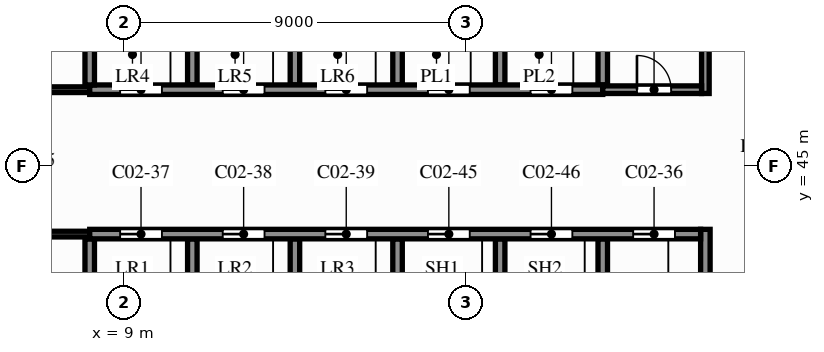
"""IFC4 building model, lengths in metres.
Left out: names, types, materials, properties, quantities, classifications, styles, units other than length and angle.
Written with IfcOpenShell. Run it as: python <this file> out.ifc"""

import sys

from ifc_helpers import new_model, si_unit, direction, frame, frame_2d, origin, place, context, subcontext, project, spatial, rectangle, extrude, element, fill, save


model = new_model("IFC4")
c1 = context("Model", 3, precision=1e-05, world=origin(), true_north=direction((0.0, 1.0)))
c2 = subcontext(c1, "Body", "Model", "MODEL_VIEW")
j1 = project(units=[si_unit("LENGTHUNIT", "METRE"), si_unit("PLANEANGLEUNIT", "RADIAN")], contexts=[c1])
p1 = place(None, origin())
s1 = spatial("IfcSite", under=j1, at=p1, CompositionType="ELEMENT")
p2 = place(p1, origin())
s2 = spatial("IfcBuilding", under=s1, at=p2, CompositionType="ELEMENT")
p3 = place(p2, origin())
s3 = spatial("IfcBuildingStorey", under=s2, at=p3, CompositionType="ELEMENT", Elevation=0.0)
p4 = place(p3, frame((0.15, 43.2, 0.0), z_axis=(0.0, 0.0, 1.0), x_axis=(1.0, 0.0, 0.0)))
e1 = element("IfcWall", 1, at=p4, inside=s3, PredefinedType="PARTITIONING", context=c2, shape_type="SweptSolid", body=[
    extrude(rectangle(XDim=7.95, YDim=0.15, at=frame_2d((3.975, 0.0))), origin(), (0.0, 0.0, 1.0), 7.2),
])
p5 = place(p4, frame((1.25, 0.0, 0.0)))
e2 = element("IfcOpeningElement", 2, at=p5, cuts=e1, PredefinedType="OPENING", context=c2, shape_type="SweptSolid", body=[
    extrude(rectangle(XDim=0.9, YDim=2.1, at=frame_2d((0.45, 1.05))), frame((0.0, 0.085, 0.0), z_axis=(0.0, -1.0, 0.0), x_axis=(1.0, 0.0, 0.0)), (0.0, 0.0, 1.0), 0.17),
])
p6 = place(p4, frame((4.975, 0.0, 0.0)))
e3 = element("IfcOpeningElement", 3, at=p6, cuts=e1, PredefinedType="OPENING", context=c2, shape_type="SweptSolid", body=[
    extrude(rectangle(XDim=0.9, YDim=2.1, at=frame_2d((0.45, 1.05))), frame((0.0, 0.085, 0.0), z_axis=(0.0, -1.0, 0.0), x_axis=(1.0, 0.0, 0.0)), (0.0, 0.0, 1.0), 0.17),
])
p7 = place(p3, frame((8.1, 43.2, 0.0), z_axis=(0.0, 0.0, 1.0), x_axis=(1.0, 0.0, 0.0)))
e4 = element("IfcWall", 4, at=p7, inside=s3, PredefinedType="SHEAR", context=c2, shape_type="SweptSolid", body=[
    extrude(rectangle(XDim=16.075, YDim=0.25, at=frame_2d((8.038, 0.0))), origin(), (0.0, 0.0, 1.0), 7.2),
])
p8 = place(p7, frame((14.3, 0.0, 0.0)))
e5 = element("IfcOpeningElement", 5, at=p8, cuts=e4, PredefinedType="OPENING", context=c2, shape_type="SweptSolid", body=[
    extrude(rectangle(XDim=1.1, YDim=2.1, at=frame_2d((0.55, 1.05))), frame((0.0, 0.135, 0.0), z_axis=(0.0, -1.0, 0.0), x_axis=(1.0, 0.0, 0.0)), (0.0, 0.0, 1.0), 0.27),
])
p9 = place(p7, frame((0.8, 0.0, 0.0)))
e6 = element("IfcOpeningElement", 6, at=p9, cuts=e4, PredefinedType="OPENING", context=c2, shape_type="SweptSolid", body=[
    extrude(rectangle(XDim=1.1, YDim=2.1, at=frame_2d((0.55, 1.05))), frame((0.0, 0.135, 0.0), z_axis=(0.0, -1.0, 0.0), x_axis=(1.0, 0.0, 0.0)), (0.0, 0.0, 1.0), 0.27),
])
p10 = place(p7, frame((3.5, 0.0, 0.0)))
e7 = element("IfcOpeningElement", 7, at=p10, cuts=e4, PredefinedType="OPENING", context=c2, shape_type="SweptSolid", body=[
    extrude(rectangle(XDim=1.1, YDim=2.1, at=frame_2d((0.55, 1.05))), frame((0.0, 0.135, 0.0), z_axis=(0.0, -1.0, 0.0), x_axis=(1.0, 0.0, 0.0)), (0.0, 0.0, 1.0), 0.27),
])
p11 = place(p7, frame((6.2, 0.0, 0.0)))
e8 = element("IfcOpeningElement", 8, at=p11, cuts=e4, PredefinedType="OPENING", context=c2, shape_type="SweptSolid", body=[
    extrude(rectangle(XDim=1.1, YDim=2.1, at=frame_2d((0.55, 1.05))), frame((0.0, 0.135, 0.0), z_axis=(0.0, -1.0, 0.0), x_axis=(1.0, 0.0, 0.0)), (0.0, 0.0, 1.0), 0.27),
])
p12 = place(p7, frame((8.9, 0.0, 0.0)))
e9 = element("IfcOpeningElement", 9, at=p12, cuts=e4, PredefinedType="OPENING", context=c2, shape_type="SweptSolid", body=[
    extrude(rectangle(XDim=1.1, YDim=2.1, at=frame_2d((0.55, 1.05))), frame((0.0, 0.135, 0.0), z_axis=(0.0, -1.0, 0.0), x_axis=(1.0, 0.0, 0.0)), (0.0, 0.0, 1.0), 0.27),
])
p13 = place(p7, frame((11.6, 0.0, 0.0)))
e10 = element("IfcOpeningElement", 10, at=p13, cuts=e4, PredefinedType="OPENING", context=c2, shape_type="SweptSolid", body=[
    extrude(rectangle(XDim=1.1, YDim=2.1, at=frame_2d((0.55, 1.05))), frame((0.0, 0.135, 0.0), z_axis=(0.0, -1.0, 0.0), x_axis=(1.0, 0.0, 0.0)), (0.0, 0.0, 1.0), 0.27),
])
p14 = place(p3, frame((0.15, 47.0, 0.0), z_axis=(0.0, 0.0, 1.0), x_axis=(1.0, 0.0, 0.0)))
e11 = element("IfcWall", 11, at=p14, inside=s3, PredefinedType="PARTITIONING", context=c2, shape_type="SweptSolid", body=[
    extrude(rectangle(XDim=7.95, YDim=0.15, at=frame_2d((3.975, 0.0))), origin(), (0.0, 0.0, 1.0), 7.2),
])
p15 = place(p14, frame((1.25, 0.0, 0.0)))
e12 = element("IfcOpeningElement", 12, at=p15, cuts=e11, PredefinedType="OPENING", context=c2, shape_type="SweptSolid", body=[
    extrude(rectangle(XDim=0.9, YDim=2.1, at=frame_2d((0.45, 1.05))), frame((0.0, 0.085, 0.0), z_axis=(0.0, -1.0, 0.0), x_axis=(1.0, 0.0, 0.0)), (0.0, 0.0, 1.0), 0.17),
])
p16 = place(p14, frame((4.975, 0.0, 0.0)))
e13 = element("IfcOpeningElement", 13, at=p16, cuts=e11, PredefinedType="OPENING", context=c2, shape_type="SweptSolid", body=[
    extrude(rectangle(XDim=0.9, YDim=2.1, at=frame_2d((0.45, 1.05))), frame((0.0, 0.085, 0.0), z_axis=(0.0, -1.0, 0.0), x_axis=(1.0, 0.0, 0.0)), (0.0, 0.0, 1.0), 0.17),
])
p17 = place(p3, frame((21.6, 47.0, 0.0), z_axis=(0.0, 0.0, 1.0), x_axis=(1.0, 0.0, 0.0)))
e14 = element("IfcWall", 14, at=p17, inside=s3, PredefinedType="PARTITIONING", context=c2, shape_type="SweptSolid", body=[
    extrude(rectangle(XDim=2.6, YDim=0.2, at=frame_2d((1.3, 0.0))), origin(), (0.0, 0.0, 1.0), 7.2),
])
p18 = place(p17, frame((0.9, 0.0, 0.0)))
e15 = element("IfcOpeningElement", 15, at=p18, cuts=e14, PredefinedType="OPENING", context=c2, shape_type="SweptSolid", body=[
    extrude(rectangle(XDim=0.9, YDim=2.1, at=frame_2d((0.45, 1.05))), frame((0.0, 0.11, 0.0), z_axis=(0.0, -1.0, 0.0), x_axis=(1.0, 0.0, 0.0)), (0.0, 0.0, 1.0), 0.22),
])
p19 = place(p3, frame((8.1, 47.0, 0.0), z_axis=(0.0, 0.0, 1.0), x_axis=(1.0, 0.0, 0.0)))
e16 = element("IfcWall", 16, at=p19, inside=s3, PredefinedType="SHEAR", context=c2, shape_type="SweptSolid", body=[
    extrude(rectangle(XDim=13.5, YDim=0.25, at=frame_2d((6.75, 0.0))), origin(), (0.0, 0.0, 1.0), 7.2),
])
p20 = place(p19, frame((0.8, 0.0, 0.0)))
e17 = element("IfcOpeningElement", 17, at=p20, cuts=e16, PredefinedType="OPENING", context=c2, shape_type="SweptSolid", body=[
    extrude(rectangle(XDim=1.1, YDim=2.1, at=frame_2d((0.55, 1.05))), frame((0.0, 0.135, 0.0), z_axis=(0.0, -1.0, 0.0), x_axis=(1.0, 0.0, 0.0)), (0.0, 0.0, 1.0), 0.27),
])
p21 = place(p19, frame((3.5, 0.0, 0.0)))
e18 = element("IfcOpeningElement", 18, at=p21, cuts=e16, PredefinedType="OPENING", context=c2, shape_type="SweptSolid", body=[
    extrude(rectangle(XDim=1.1, YDim=2.1, at=frame_2d((0.55, 1.05))), frame((0.0, 0.135, 0.0), z_axis=(0.0, -1.0, 0.0), x_axis=(1.0, 0.0, 0.0)), (0.0, 0.0, 1.0), 0.27),
])
p22 = place(p19, frame((6.2, 0.0, 0.0)))
e19 = element("IfcOpeningElement", 19, at=p22, cuts=e16, PredefinedType="OPENING", context=c2, shape_type="SweptSolid", body=[
    extrude(rectangle(XDim=1.1, YDim=2.1, at=frame_2d((0.55, 1.05))), frame((0.0, 0.135, 0.0), z_axis=(0.0, -1.0, 0.0), x_axis=(1.0, 0.0, 0.0)), (0.0, 0.0, 1.0), 0.27),
])
p23 = place(p19, frame((8.9, 0.0, 0.0)))
e20 = element("IfcOpeningElement", 20, at=p23, cuts=e16, PredefinedType="OPENING", context=c2, shape_type="SweptSolid", body=[
    extrude(rectangle(XDim=1.1, YDim=2.1, at=frame_2d((0.55, 1.05))), frame((0.0, 0.135, 0.0), z_axis=(0.0, -1.0, 0.0), x_axis=(1.0, 0.0, 0.0)), (0.0, 0.0, 1.0), 0.27),
])
p24 = place(p19, frame((11.6, 0.0, 0.0)))
e21 = element("IfcOpeningElement", 21, at=p24, cuts=e16, PredefinedType="OPENING", context=c2, shape_type="SweptSolid", body=[
    extrude(rectangle(XDim=1.1, YDim=2.1, at=frame_2d((0.55, 1.05))), frame((0.0, 0.135, 0.0), z_axis=(0.0, -1.0, 0.0), x_axis=(1.0, 0.0, 0.0)), (0.0, 0.0, 1.0), 0.27),
])
for number, where, z_axis, x_axis in (
    (22, (8.1, 40.125, 0.0), (0.0, 0.0, 1.0), (0.0, 1.0, 0.0)),
    (23, (8.1, 47.125, 0.0), (0.0, 0.0, 1.0), (0.0, 1.0, 0.0)),
    (24, (10.8, 40.125, 0.0), (0.0, 0.0, 1.0), (0.0, 1.0, 0.0)),
    (25, (10.8, 47.125, 0.0), (0.0, 0.0, 1.0), (0.0, 1.0, 0.0)),
    (26, (13.5, 40.125, 0.0), (0.0, 0.0, 1.0), (0.0, 1.0, 0.0)),
    (27, (13.5, 47.125, 0.0), (0.0, 0.0, 1.0), (0.0, 1.0, 0.0)),
    (28, (16.2, 40.125, 0.0), (0.0, 0.0, 1.0), (0.0, 1.0, 0.0)),
    (29, (16.2, 47.125, 0.0), (0.0, 0.0, 1.0), (0.0, 1.0, 0.0)),
    (30, (18.9, 40.125, 0.0), (0.0, 0.0, 1.0), (0.0, 1.0, 0.0)),
    (31, (18.9, 47.125, 0.0), (0.0, 0.0, 1.0), (0.0, 1.0, 0.0)),
    (32, (21.6, 40.125, 0.0), (0.0, 0.0, 1.0), (0.0, 1.0, 0.0)),
):
    element("IfcWall", number, at=place(p3, frame(where, z_axis=z_axis, x_axis=x_axis)), inside=s3, PredefinedType="SHEAR", context=c2, shape_type="SweptSolid", body=[
        extrude(rectangle(XDim=2.95, YDim=0.25, at=frame_2d((1.475, 0.0))), origin(), (0.0, 0.0, 1.0), 7.2),
    ])
p25 = place(p3, frame((21.6, 47.125, 0.0), z_axis=(0.0, 0.0, 1.0), x_axis=(0.0, 1.0, 0.0)))
e33 = element("IfcWall", 33, at=p25, inside=s3, PredefinedType="SHEAR", context=c2, shape_type="SweptSolid", body=[
    extrude(rectangle(XDim=3.075, YDim=0.25, at=frame_2d((1.538, 0.0))), origin(), (0.0, 0.0, 1.0), 7.2),
])
p26 = place(p3, frame((24.3, 46.9, 0.0), z_axis=(0.0, 0.0, 1.0), x_axis=(0.0, 1.0, 0.0)))
e34 = element("IfcWall", 34, at=p26, inside=s3, PredefinedType="SHEAR", context=c2, shape_type="SweptSolid", body=[
    extrude(rectangle(XDim=5.0, YDim=0.2, at=frame_2d((2.5, 0.0))), origin(), (0.0, 0.0, 1.0), 7.2),
])
p27 = place(p3, frame((24.3, 40.0, 0.0), z_axis=(0.0, 0.0, 1.0), x_axis=(0.0, 1.0, 0.0)))
e35 = element("IfcWall", 35, at=p27, inside=s3, PredefinedType="SHEAR", context=c2, shape_type="SweptSolid", body=[
    extrude(rectangle(XDim=3.325, YDim=0.25, at=frame_2d((1.663, 0.0))), origin(), (0.0, 0.0, 1.0), 7.2),
])
p28 = place(p18, origin())
e36 = element("IfcDoor", 36, at=p28, inside=s3, OperationType="SINGLE_SWING_LEFT", PredefinedType="DOOR", context=c2, shape_type="SweptSolid", body=[
    extrude(rectangle(XDim=0.9, YDim=2.1, at=frame_2d((0.45, 1.05))), frame((0.0, 0.025, 0.0), z_axis=(0.0, -1.0, 0.0), x_axis=(1.0, 0.0, 0.0)), (0.0, 0.0, 1.0), 0.05),
])
fill(e15, e36)
p29 = place(p8, origin())
e37 = element("IfcDoor", 37, at=p29, inside=s3, OperationType="DOUBLE_DOOR_SLIDING", PredefinedType="DOOR", context=c2, shape_type="SweptSolid", body=[
    extrude(rectangle(XDim=1.1, YDim=2.1, at=frame_2d((0.55, 1.05))), frame((0.0, 0.025, 0.0), z_axis=(0.0, -1.0, 0.0), x_axis=(1.0, 0.0, 0.0)), (0.0, 0.0, 1.0), 0.05),
])
fill(e5, e37)
p30 = place(p9, origin())
e38 = element("IfcDoor", 38, at=p30, inside=s3, OperationType="DOUBLE_DOOR_SLIDING", PredefinedType="DOOR", context=c2, shape_type="SweptSolid", body=[
    extrude(rectangle(XDim=1.1, YDim=2.1, at=frame_2d((0.55, 1.05))), frame((0.0, 0.025, 0.0), z_axis=(0.0, -1.0, 0.0), x_axis=(1.0, 0.0, 0.0)), (0.0, 0.0, 1.0), 0.05),
])
fill(e6, e38)
p31 = place(p10, origin())
e39 = element("IfcDoor", 39, at=p31, inside=s3, OperationType="DOUBLE_DOOR_SLIDING", PredefinedType="DOOR", context=c2, shape_type="SweptSolid", body=[
    extrude(rectangle(XDim=1.1, YDim=2.1, at=frame_2d((0.55, 1.05))), frame((0.0, 0.025, 0.0), z_axis=(0.0, -1.0, 0.0), x_axis=(1.0, 0.0, 0.0)), (0.0, 0.0, 1.0), 0.05),
])
fill(e7, e39)
p32 = place(p11, origin())
e40 = element("IfcDoor", 40, at=p32, inside=s3, OperationType="DOUBLE_DOOR_SLIDING", PredefinedType="DOOR", context=c2, shape_type="SweptSolid", body=[
    extrude(rectangle(XDim=1.1, YDim=2.1, at=frame_2d((0.55, 1.05))), frame((0.0, 0.025, 0.0), z_axis=(0.0, -1.0, 0.0), x_axis=(1.0, 0.0, 0.0)), (0.0, 0.0, 1.0), 0.05),
])
fill(e8, e40)
p33 = place(p20, origin())
e41 = element("IfcDoor", 41, at=p33, inside=s3, OperationType="DOUBLE_DOOR_SLIDING", PredefinedType="DOOR", context=c2, shape_type="SweptSolid", body=[
    extrude(rectangle(XDim=1.1, YDim=2.1, at=frame_2d((0.55, 1.05))), frame((0.0, 0.025, 0.0), z_axis=(0.0, -1.0, 0.0), x_axis=(1.0, 0.0, 0.0)), (0.0, 0.0, 1.0), 0.05),
])
fill(e17, e41)
p34 = place(p21, origin())
e42 = element("IfcDoor", 42, at=p34, inside=s3, OperationType="DOUBLE_DOOR_SLIDING", PredefinedType="DOOR", context=c2, shape_type="SweptSolid", body=[
    extrude(rectangle(XDim=1.1, YDim=2.1, at=frame_2d((0.55, 1.05))), frame((0.0, 0.025, 0.0), z_axis=(0.0, -1.0, 0.0), x_axis=(1.0, 0.0, 0.0)), (0.0, 0.0, 1.0), 0.05),
])
fill(e18, e42)
p35 = place(p22, origin())
e43 = element("IfcDoor", 43, at=p35, inside=s3, OperationType="DOUBLE_DOOR_SLIDING", PredefinedType="DOOR", context=c2, shape_type="SweptSolid", body=[
    extrude(rectangle(XDim=1.1, YDim=2.1, at=frame_2d((0.55, 1.05))), frame((0.0, 0.025, 0.0), z_axis=(0.0, -1.0, 0.0), x_axis=(1.0, 0.0, 0.0)), (0.0, 0.0, 1.0), 0.05),
])
fill(e19, e43)
p36 = place(p23, origin())
e44 = element("IfcDoor", 44, at=p36, inside=s3, OperationType="DOUBLE_DOOR_SLIDING", PredefinedType="DOOR", context=c2, shape_type="SweptSolid", body=[
    extrude(rectangle(XDim=1.1, YDim=2.1, at=frame_2d((0.55, 1.05))), frame((0.0, 0.025, 0.0), z_axis=(0.0, -1.0, 0.0), x_axis=(1.0, 0.0, 0.0)), (0.0, 0.0, 1.0), 0.05),
])
fill(e20, e44)
p37 = place(p24, origin())
e45 = element("IfcDoor", 45, at=p37, inside=s3, OperationType="DOUBLE_DOOR_SLIDING", PredefinedType="DOOR", context=c2, shape_type="SweptSolid", body=[
    extrude(rectangle(XDim=1.1, YDim=2.1, at=frame_2d((0.55, 1.05))), frame((0.0, 0.025, 0.0), z_axis=(0.0, -1.0, 0.0), x_axis=(1.0, 0.0, 0.0)), (0.0, 0.0, 1.0), 0.05),
])
fill(e21, e45)
p38 = place(p12, origin())
e46 = element("IfcDoor", 46, at=p38, inside=s3, OperationType="DOUBLE_DOOR_SLIDING", PredefinedType="DOOR", context=c2, shape_type="SweptSolid", body=[
    extrude(rectangle(XDim=1.1, YDim=2.1, at=frame_2d((0.55, 1.05))), frame((0.0, 0.025, 0.0), z_axis=(0.0, -1.0, 0.0), x_axis=(1.0, 0.0, 0.0)), (0.0, 0.0, 1.0), 0.05),
])
fill(e9, e46)
p39 = place(p13, origin())
e47 = element("IfcDoor", 47, at=p39, inside=s3, OperationType="DOUBLE_DOOR_SLIDING", PredefinedType="DOOR", context=c2, shape_type="SweptSolid", body=[
    extrude(rectangle(XDim=1.1, YDim=2.1, at=frame_2d((0.55, 1.05))), frame((0.0, 0.025, 0.0), z_axis=(0.0, -1.0, 0.0), x_axis=(1.0, 0.0, 0.0)), (0.0, 0.0, 1.0), 0.05),
])
fill(e10, e47)
save(model, sys.argv[1])
